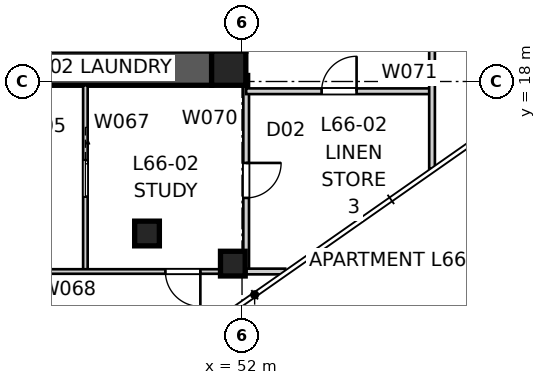
"""IFC4 building model, lengths in metres.
Left out: names, types, materials, properties, quantities, classifications, styles, units other than length and angle.
Written with IfcOpenShell. Run it as: python <this file> out.ifc"""

import sys

from ifc_helpers import new_model, si_unit, direction, frame, frame_2d, origin, origin_2d, place, context, subcontext, project, spatial, polyline, rectangle, outline, extrude, element, fill, save


model = new_model("IFC4")
c1 = context("Model", 3, precision=1e-05, world=origin(), true_north=direction((0.0, 1.0)))
c2 = subcontext(c1, "Body", "Model", "MODEL_VIEW")
j1 = project(units=[si_unit("LENGTHUNIT", "METRE"), si_unit("PLANEANGLEUNIT", "RADIAN")], contexts=[c1])
p1 = place(None, origin())
s1 = spatial("IfcSite", under=j1, at=p1, CompositionType="ELEMENT")
p2 = place(p1, origin())
s2 = spatial("IfcBuilding", under=s1, at=p2, CompositionType="ELEMENT")
p3 = place(p2, frame((0.0, 0.0, 240.4)))
s3 = spatial("IfcBuildingStorey", under=s2, at=p3, CompositionType="ELEMENT", Elevation=240.4)
p4 = place(p3, frame((51.2, 18.35, 0.0), z_axis=(0.0, 0.0, 1.0), x_axis=(-1.0, 0.0, 0.0)))
e1 = element("IfcWall", 1, at=p4, inside=s3, PredefinedType="SHEAR", context=c2, shape_type="SweptSolid", body=[
    extrude(outline(polyline([(0.0, -0.45), (22.4, -0.45), (22.4, -0.025), (22.85, -0.025), (22.85, 0.025), (22.4, 0.025), (22.4, 0.45), (0.0, 0.45), (0.0, 0.025), (-0.45, 0.025), (-0.45, -0.025), (0.0, -0.025), (0.0, -0.45)])), origin(), (0.0, 0.0, 1.0), 3.4),
])
p5 = place(p3, frame((51.65, 18.8, 0.0), z_axis=(0.0, 0.0, 1.0), x_axis=(0.0, 1.0, 0.0)))
e2 = element("IfcWall", 2, at=p5, inside=s3, PredefinedType="SHEAR", context=c2, shape_type="SweptSolid", body=[
    extrude(outline(polyline([(0.0, -0.45), (22.4, -0.45), (22.4, -0.025), (22.85, -0.025), (22.85, 0.025), (22.4, 0.025), (22.4, 0.45), (0.0, 0.45), (0.0, 0.025), (-0.45, 0.025), (-0.45, -0.025), (0.0, -0.025), (0.0, -0.45)])), origin(), (0.0, 0.0, 1.0), 3.4),
])
p6 = place(p5, frame((11.14, 0.0, 0.0)))
e3 = element("IfcOpeningElement", 3, at=p6, cuts=e2, PredefinedType="OPENING", context=c2, shape_type="SweptSolid", body=[
    extrude(rectangle(XDim=1.02, YDim=2.4, at=frame_2d((0.51, 1.2))), frame((0.0, 0.46, 0.0), z_axis=(0.0, -1.0, 0.0), x_axis=(1.0, 0.0, 0.0)), (0.0, 0.0, 1.0), 0.92),
])
p7 = place(p3, frame((51.65, 18.35, 0.0), z_axis=(0.0, 0.0, 1.0), x_axis=(1.0, 0.0, 0.0)))
e4 = element("IfcColumn", 4, at=p7, inside=s3, PredefinedType="COLUMN", context=c2, shape_type="SweptSolid", body=[
    extrude(rectangle(XDim=0.9, YDim=0.9, at=origin_2d()), origin(), (0.0, 0.0, 1.0), 3.4),
])
p8 = place(p3, frame((51.758, 13.207, -0.15), z_axis=(0.0, 0.0, 1.0), x_axis=(1.0, 0.0, 0.0)))
e5 = element("IfcColumn", 5, at=p8, inside=s3, PredefinedType="COLUMN", context=c2, shape_type="SweptSolid", body=[
    extrude(rectangle(XDim=0.65, YDim=0.65, at=origin_2d()), origin(), (0.0, 0.0, 1.0), 3.55),
])
p9 = place(p3, frame((49.5, 14.0, 0.0), z_axis=(0.0, 0.0, 1.0), x_axis=(1.0, 0.0, 0.0)))
e6 = element("IfcColumn", 6, at=p9, inside=s3, PredefinedType="COLUMN", context=c2, shape_type="SweptSolid", body=[
    extrude(rectangle(XDim=0.65, YDim=0.65, at=origin_2d()), origin(), (0.0, 0.0, 1.0), 3.4),
])
p10 = place(p3, frame((47.878, 17.9, 0.0), z_axis=(0.0, 0.0, 1.0), x_axis=(0.0, -1.0, 0.0)))
e7 = element("IfcWall", 7, at=p10, inside=s3, PredefinedType="PARTITIONING", context=c2, shape_type="SweptSolid", body=[
    extrude(rectangle(XDim=4.9, YDim=0.12, at=frame_2d((2.45, 0.0))), origin(), (0.0, 0.0, 1.0), 3.25),
])
p11 = place(p10, frame((1.97, 0.0, 0.0)))
e8 = element("IfcOpeningElement", 8, at=p11, cuts=e7, PredefinedType="OPENING", context=c2, shape_type="SweptSolid", body=[
    extrude(rectangle(XDim=0.96, YDim=2.1, at=frame_2d((0.48, 1.05))), frame((0.0, 0.07, 0.0), z_axis=(0.0, -1.0, 0.0), x_axis=(1.0, 0.0, 0.0)), (0.0, 0.0, 1.0), 0.14),
])
p12 = place(p3, frame((52.109, 13.0, 0.0), z_axis=(0.0, 0.0, 1.0), x_axis=(-1.0, 0.0, 0.0)))
e9 = element("IfcWall", 9, at=p12, inside=s3, PredefinedType="PARTITIONING", context=c2, shape_type="SweptSolid", body=[
    extrude(rectangle(XDim=7.238, YDim=0.12, at=frame_2d((3.619, 0.0))), origin(), (0.0, 0.0, 1.0), 2.55),
])
p13 = place(p12, frame((1.205, 0.0, 0.0)))
e10 = element("IfcOpeningElement", 10, at=p13, cuts=e9, PredefinedType="OPENING", context=c2, shape_type="SweptSolid", body=[
    extrude(rectangle(XDim=0.92, YDim=2.34, at=frame_2d((0.46, 1.17))), frame((0.0, 0.07, 0.0), z_axis=(0.0, -1.0, 0.0), x_axis=(1.0, 0.0, 0.0)), (0.0, 0.0, 1.0), 0.14),
])
p14 = place(p3, frame((52.109, 18.194, 0.0), z_axis=(0.0, 0.0, 1.0), x_axis=(0.0, -1.0, 0.0)))
e11 = element("IfcWall", 11, at=p14, inside=s3, PredefinedType="SOLIDWALL", context=c2, shape_type="SweptSolid", body=[
    extrude(rectangle(XDim=5.194, YDim=0.15, at=frame_2d((2.597, 0.0))), origin(), (0.0, 0.0, 1.0), 3.25),
])
p15 = place(p14, frame((2.337, 0.0, 0.0)))
e12 = element("IfcOpeningElement", 12, at=p15, cuts=e11, PredefinedType="OPENING", context=c2, shape_type="SweptSolid", body=[
    extrude(rectangle(XDim=0.92, YDim=2.34, at=frame_2d((0.46, 1.17))), frame((0.0, 0.085, 0.0), z_axis=(0.0, -1.0, 0.0), x_axis=(1.0, 0.0, 0.0)), (0.0, 0.0, 1.0), 0.17),
])
p16 = place(p3, frame((52.109, 17.743, 0.0), z_axis=(0.0, 0.0, 1.0), x_axis=(1.0, 0.0, 0.0)))
e13 = element("IfcWall", 13, at=p16, inside=s3, PredefinedType="SOLIDWALL", context=c2, shape_type="SweptSolid", body=[
    extrude(rectangle(XDim=4.891, YDim=0.15, at=frame_2d((2.446, 0.0))), origin(), (0.0, 0.0, 1.0), 3.25),
])
p17 = place(p16, frame((1.986, 0.0, 0.0)))
e14 = element("IfcOpeningElement", 14, at=p17, cuts=e13, PredefinedType="OPENING", context=c2, shape_type="SweptSolid", body=[
    extrude(rectangle(XDim=0.92, YDim=2.34, at=frame_2d((0.46, 1.17))), frame((0.0, 0.085, 0.0), z_axis=(0.0, -1.0, 0.0), x_axis=(1.0, 0.0, 0.0)), (0.0, 0.0, 1.0), 0.17),
])
p18 = place(p3, frame((57.0, 21.406, 0.0), z_axis=(0.0, 0.0, 1.0), x_axis=(0.0, -1.0, 0.0)))
e15 = element("IfcWall", 15, at=p18, inside=s3, PredefinedType="SOLIDWALL", context=c2, shape_type="SweptSolid", body=[
    extrude(rectangle(XDim=5.7, YDim=0.15, at=frame_2d((2.85, 0.0))), origin(), (0.0, 0.0, 1.0), 3.25),
])
p19 = place(p3, frame((53.136, 13.0, 0.0), z_axis=(0.0, 0.0, 1.0), x_axis=(-1.0, 0.0, 0.0)))
e16 = element("IfcWall", 16, at=p19, inside=s3, PredefinedType="SOLIDWALL", context=c2, shape_type="SweptSolid", body=[
    extrude(rectangle(XDim=1.027, YDim=0.15, at=frame_2d((0.513, 0.0))), origin(), (0.0, 0.0, 1.0), 3.25),
])
p20 = place(p17, origin())
e17 = element("IfcDoor", 17, at=p20, inside=s3, OperationType="SINGLE_SWING_RIGHT", PredefinedType="DOOR", context=c2, shape_type="SweptSolid", body=[
    extrude(rectangle(XDim=0.92, YDim=2.34, at=frame_2d((0.46, 1.17))), frame((0.0, 0.025, 0.0), z_axis=(0.0, -1.0, 0.0), x_axis=(1.0, 0.0, 0.0)), (0.0, 0.0, 1.0), 0.05),
])
fill(e14, e17)
p21 = place(p15, origin())
e18 = element("IfcDoor", 18, at=p21, inside=s3, OperationType="SINGLE_SWING_LEFT", PredefinedType="DOOR", context=c2, shape_type="SweptSolid", body=[
    extrude(rectangle(XDim=0.92, YDim=2.34, at=frame_2d((0.46, 1.17))), frame((0.0, 0.025, 0.0), z_axis=(0.0, -1.0, 0.0), x_axis=(1.0, 0.0, 0.0)), (0.0, 0.0, 1.0), 0.05),
])
fill(e12, e18)
p22 = place(p11, origin())
e19 = element("IfcDoor", 19, at=p22, inside=s3, OperationType="SLIDING_TO_LEFT", PredefinedType="DOOR", context=c2, shape_type="SweptSolid", body=[
    extrude(rectangle(XDim=0.96, YDim=2.1, at=frame_2d((0.48, 1.05))), frame((0.0, 0.025, 0.0), z_axis=(0.0, -1.0, 0.0), x_axis=(1.0, 0.0, 0.0)), (0.0, 0.0, 1.0), 0.05),
])
fill(e8, e19)
p23 = place(p13, origin())
e20 = element("IfcDoor", 20, at=p23, inside=s3, OperationType="SINGLE_SWING_LEFT", PredefinedType="DOOR", context=c2, shape_type="SweptSolid", body=[
    extrude(rectangle(XDim=0.92, YDim=2.34, at=frame_2d((0.46, 1.17))), frame((0.0, 0.025, 0.0), z_axis=(0.0, -1.0, 0.0), x_axis=(1.0, 0.0, 0.0)), (0.0, 0.0, 1.0), 0.05),
])
fill(e10, e20)
save(model, sys.argv[1])
